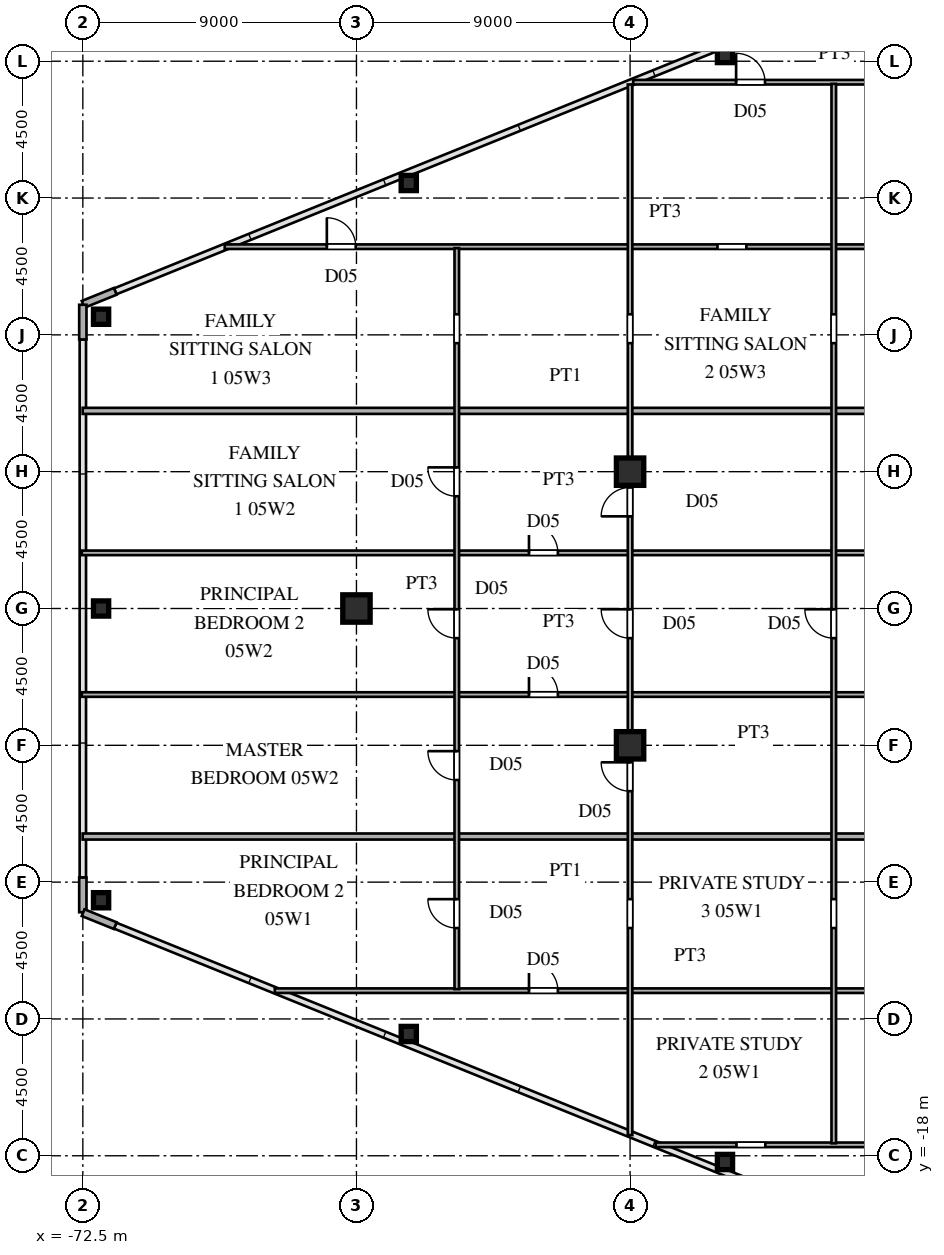
"""IFC4 building model, lengths in metres.
Left out: names, types, materials, properties, quantities, classifications, styles, units other than length and angle.
Written with IfcOpenShell. Run it as: python <this file> out.ifc"""

import sys

from ifc_helpers import new_model, si_unit, direction, frame, frame_2d, origin, origin_2d, place, context, subcontext, project, spatial, rectangle, hollow_rectangle, i_section, extrude, source, transform, mapped, element, fill, save


model = new_model("IFC4")
c1 = context("Model", 3, precision=1e-05, world=origin(), true_north=direction((0.0, 1.0)))
c2 = subcontext(c1, "Body", "Model", "MODEL_VIEW")
j1 = project(units=[si_unit("LENGTHUNIT", "METRE"), si_unit("PLANEANGLEUNIT", "RADIAN")], contexts=[c1])
p1 = place(None, origin())
s1 = spatial("IfcSite", under=j1, at=p1, CompositionType="ELEMENT")
p2 = place(p1, origin())
s2 = spatial("IfcBuilding", under=s1, at=p2, CompositionType="ELEMENT")
p3 = place(p2, frame((0.0, 0.0, 22.5)))
s3 = spatial("IfcBuildingStorey", under=s2, at=p3, CompositionType="ELEMENT", Elevation=22.5)
m1 = source(origin(), c2, "Body", "SweptSolid", [
    extrude(i_section(OverallWidth=0.9, OverallDepth=0.9, WebThickness=0.036, FlangeThickness=0.055, at=origin_2d()), origin(), (0.0, 0.0, 1.0), 3.6),
])
for number, where, z_axis, x_axis in (
    (1, (-54.5, -4.5, 0.0), (0.0, 0.0, 1.0), (1.0, 0.0, 0.0)),
    (2, (-54.5, 4.5, 0.0), (0.0, 0.0, 1.0), (1.0, 0.0, 0.0)),
    (3, (-63.5, 0.0, 0.0), (0.0, 0.0, 1.0), (1.0, 0.0, 0.0)),
):
    element("IfcColumn", number, at=place(p3, frame(where, z_axis=z_axis, x_axis=x_axis)), inside=s3, PredefinedType="COLUMN", context=c2, shape_type="MappedRepresentation", body=[
        mapped(m1, transform((0.0, 0.0, 0.0), scale=1.0)),
    ])
m2 = source(origin(), c2, "Body", "SweptSolid", [
    extrude(hollow_rectangle(XDim=0.5, YDim=0.5, WallThickness=0.02, at=origin_2d()), origin(), (0.0, 0.0, 1.0), 3.6),
])
for number, where, z_axis, x_axis in (
    (4, (-71.9, 9.596, 0.0), (0.0, 0.0, 1.0), (1.0, 0.0, 0.0)),
    (5, (-71.9, -9.596, 0.0), (0.0, 0.0, 1.0), (1.0, 0.0, 0.0)),
    (6, (-51.378, -18.204, 0.0), (0.0, 0.0, 1.0), (1.0, 0.0, 0.0)),
    (7, (-61.779, -13.994, 0.0), (0.0, 0.0, 1.0), (1.0, 0.0, 0.0)),
    (8, (-51.378, 18.204, 0.0), (0.0, 0.0, 1.0), (1.0, 0.0, 0.0)),
    (9, (-61.779, 13.994, 0.0), (0.0, 0.0, 1.0), (1.0, 0.0, 0.0)),
    (10, (-71.9, 0.0, 0.0), (0.0, 0.0, 1.0), (1.0, 0.0, 0.0)),
):
    element("IfcColumn", number, at=place(p3, frame(where, z_axis=z_axis, x_axis=x_axis)), inside=s3, PredefinedType="COLUMN", context=c2, shape_type="MappedRepresentation", body=[
        mapped(m2, transform((0.0, 0.0, 0.0), scale=1.0)),
    ])
for number, where, z_axis, x_axis in (
    (11, (-71.434, 10.431, 0.0), (0.0, 0.0, 1.0), (-0.927, -0.375, 0.0)),
    (12, (-72.5, 9.99, 0.0), (0.0, 0.0, 1.0), (0.0, -1.0, 0.0)),
    (13, (-72.5, -8.85, 0.0), (0.0, 0.0, 1.0), (0.0, -1.0, 0.0)),
    (14, (-72.491, -10.004, 0.0), (0.0, 0.0, 1.0), (0.927, -0.375, 0.0)),
):
    element("IfcWall", number, at=place(p3, frame(where, z_axis=z_axis, x_axis=x_axis)), inside=s3, PredefinedType="SOLIDWALL", context=c2, shape_type="SweptSolid", body=[
        extrude(rectangle(XDim=1.14, YDim=0.24, at=frame_2d((0.57, 0.0))), origin(), (0.0, 0.0, 1.0), 3.38),
    ])
p4 = place(p3, frame((-53.66, -17.64, 0.0), z_axis=(0.0, 0.0, 1.0), x_axis=(1.0, 0.0, 0.0)))
e15 = element("IfcWall", 15, at=p4, inside=s3, PredefinedType="PARTITIONING", context=c2, shape_type="SweptSolid", body=[
    extrude(rectangle(XDim=12.51, YDim=0.15, at=frame_2d((6.255, 0.0))), origin(), (0.0, 0.0, 1.0), 3.38),
])
p5 = place(p4, frame((8.735, 0.0, 0.0)))
e16 = element("IfcOpeningElement", 16, at=p5, cuts=e15, PredefinedType="OPENING", context=c2, shape_type="SweptSolid", body=[
    extrude(rectangle(XDim=0.95, YDim=2.15, at=frame_2d((0.475, 1.075))), frame((0.0, 0.085, 0.0), z_axis=(0.0, -1.0, 0.0), x_axis=(1.0, 0.0, 0.0)), (0.0, 0.0, 1.0), 0.17),
])
p6 = place(p4, frame((2.659, 0.0, 0.0)))
e17 = element("IfcOpeningElement", 17, at=p6, cuts=e15, PredefinedType="OPENING", context=c2, shape_type="SweptSolid", body=[
    extrude(rectangle(XDim=0.95, YDim=2.15, at=frame_2d((0.475, 1.075))), frame((0.0, 0.085, 0.0), z_axis=(0.0, -1.0, 0.0), x_axis=(1.0, 0.0, 0.0)), (0.0, 0.0, 1.0), 0.17),
])
p7 = place(p3, frame((-66.186, -12.57, 0.0), z_axis=(0.0, 0.0, 1.0), x_axis=(1.0, 0.0, 0.0)))
e18 = element("IfcWall", 18, at=p7, inside=s3, PredefinedType="PARTITIONING", context=c2, shape_type="SweptSolid", body=[
    extrude(rectangle(XDim=25.036, YDim=0.15, at=frame_2d((12.518, 0.0))), origin(), (0.0, 0.0, 1.0), 3.38),
])
p8 = place(p7, frame((21.261, 0.0, 0.0)))
e19 = element("IfcOpeningElement", 19, at=p8, cuts=e18, PredefinedType="OPENING", context=c2, shape_type="SweptSolid", body=[
    extrude(rectangle(XDim=0.95, YDim=2.15, at=frame_2d((0.475, 1.075))), frame((0.0, 0.085, 0.0), z_axis=(0.0, -1.0, 0.0), x_axis=(1.0, 0.0, 0.0)), (0.0, 0.0, 1.0), 0.17),
])
p9 = place(p7, frame((8.361, 0.0, 0.0)))
e20 = element("IfcOpeningElement", 20, at=p9, cuts=e18, PredefinedType="OPENING", context=c2, shape_type="SweptSolid", body=[
    extrude(rectangle(XDim=0.95, YDim=2.15, at=frame_2d((0.475, 1.075))), frame((0.0, 0.085, 0.0), z_axis=(0.0, -1.0, 0.0), x_axis=(1.0, 0.0, 0.0)), (0.0, 0.0, 1.0), 0.17),
])
p10 = place(p3, frame((-72.505, -7.5, 0.0), z_axis=(0.0, 0.0, 1.0), x_axis=(1.0, 0.0, 0.0)))
e21 = element("IfcWall", 21, at=p10, inside=s3, PredefinedType="PARTITIONING", context=c2, shape_type="SweptSolid", body=[
    extrude(rectangle(XDim=34.075, YDim=0.2, at=frame_2d((17.038, 0.0))), origin(), (0.0, 0.0, 1.0), 3.38),
])
p11 = place(p3, frame((-72.535, -2.83, 0.0), z_axis=(0.0, 0.0, 1.0), x_axis=(1.0, 0.0, 0.0)))
e22 = element("IfcWall", 22, at=p11, inside=s3, PredefinedType="PARTITIONING", context=c2, shape_type="SweptSolid", body=[
    extrude(rectangle(XDim=31.385, YDim=0.15, at=frame_2d((15.692, 0.0))), origin(), (0.0, 0.0, 1.0), 3.38),
])
p12 = place(p11, frame((27.61, 0.0, 0.0)))
e23 = element("IfcOpeningElement", 23, at=p12, cuts=e22, PredefinedType="OPENING", context=c2, shape_type="SweptSolid", body=[
    extrude(rectangle(XDim=0.95, YDim=2.15, at=frame_2d((0.475, 1.075))), frame((0.0, 0.085, 0.0), z_axis=(0.0, -1.0, 0.0), x_axis=(1.0, 0.0, 0.0)), (0.0, 0.0, 1.0), 0.17),
])
p13 = place(p11, frame((14.71, 0.0, 0.0)))
e24 = element("IfcOpeningElement", 24, at=p13, cuts=e22, PredefinedType="OPENING", context=c2, shape_type="SweptSolid", body=[
    extrude(rectangle(XDim=0.95, YDim=2.15, at=frame_2d((0.475, 1.075))), frame((0.0, 0.085, 0.0), z_axis=(0.0, -1.0, 0.0), x_axis=(1.0, 0.0, 0.0)), (0.0, 0.0, 1.0), 0.17),
])
p14 = place(p3, frame((-72.535, 1.83, 0.0), z_axis=(0.0, 0.0, 1.0), x_axis=(1.0, 0.0, 0.0)))
e25 = element("IfcWall", 25, at=p14, inside=s3, PredefinedType="PARTITIONING", context=c2, shape_type="SweptSolid", body=[
    extrude(rectangle(XDim=31.385, YDim=0.15, at=frame_2d((15.692, 0.0))), origin(), (0.0, 0.0, 1.0), 3.38),
])
p15 = place(p14, frame((27.61, 0.0, 0.0)))
e26 = element("IfcOpeningElement", 26, at=p15, cuts=e25, PredefinedType="OPENING", context=c2, shape_type="SweptSolid", body=[
    extrude(rectangle(XDim=0.95, YDim=2.15, at=frame_2d((0.475, 1.075))), frame((0.0, 0.085, 0.0), z_axis=(0.0, -1.0, 0.0), x_axis=(1.0, 0.0, 0.0)), (0.0, 0.0, 1.0), 0.17),
])
p16 = place(p14, frame((14.71, 0.0, 0.0)))
e27 = element("IfcOpeningElement", 27, at=p16, cuts=e25, PredefinedType="OPENING", context=c2, shape_type="SweptSolid", body=[
    extrude(rectangle(XDim=0.95, YDim=2.15, at=frame_2d((0.475, 1.075))), frame((0.0, 0.085, 0.0), z_axis=(0.0, -1.0, 0.0), x_axis=(1.0, 0.0, 0.0)), (0.0, 0.0, 1.0), 0.17),
])
p17 = place(p3, frame((-72.505, 6.5, 0.0), z_axis=(0.0, 0.0, 1.0), x_axis=(1.0, 0.0, 0.0)))
e28 = element("IfcWall", 28, at=p17, inside=s3, PredefinedType="PARTITIONING", context=c2, shape_type="SweptSolid", body=[
    extrude(rectangle(XDim=34.075, YDim=0.2, at=frame_2d((17.038, 0.0))), origin(), (0.0, 0.0, 1.0), 3.38),
])
p18 = place(p3, frame((-67.833, 11.9, 0.0), z_axis=(0.0, 0.0, 1.0), x_axis=(1.0, 0.0, 0.0)))
e29 = element("IfcWall", 29, at=p18, inside=s3, PredefinedType="PARTITIONING", context=c2, shape_type="SweptSolid", body=[
    extrude(rectangle(XDim=26.683, YDim=0.15, at=frame_2d((13.342, 0.0))), origin(), (0.0, 0.0, 1.0), 3.38),
])
p19 = place(p18, frame((22.908, 0.0, 0.0)))
e30 = element("IfcOpeningElement", 30, at=p19, cuts=e29, PredefinedType="OPENING", context=c2, shape_type="SweptSolid", body=[
    extrude(rectangle(XDim=0.95, YDim=2.15, at=frame_2d((0.475, 1.075))), frame((0.0, 0.085, 0.0), z_axis=(0.0, -1.0, 0.0), x_axis=(1.0, 0.0, 0.0)), (0.0, 0.0, 1.0), 0.17),
])
p20 = place(p18, frame((3.359, 0.0, 0.0)))
e31 = element("IfcOpeningElement", 31, at=p20, cuts=e29, PredefinedType="OPENING", context=c2, shape_type="SweptSolid", body=[
    extrude(rectangle(XDim=0.95, YDim=2.15, at=frame_2d((0.475, 1.075))), frame((0.0, 0.085, 0.0), z_axis=(0.0, -1.0, 0.0), x_axis=(1.0, 0.0, 0.0)), (0.0, 0.0, 1.0), 0.17),
])
p21 = place(p18, frame((16.208, 0.0, 0.0)))
e32 = element("IfcOpeningElement", 32, at=p21, cuts=e29, PredefinedType="OPENING", context=c2, shape_type="SweptSolid", body=[
    extrude(rectangle(XDim=0.95, YDim=2.15, at=frame_2d((0.475, 1.075))), frame((0.0, 0.085, 0.0), z_axis=(0.0, -1.0, 0.0), x_axis=(1.0, 0.0, 0.0)), (0.0, 0.0, 1.0), 0.17),
])
p22 = place(p3, frame((-54.399, 17.31, 0.0), z_axis=(0.0, 0.0, 1.0), x_axis=(1.0, 0.0, 0.0)))
e33 = element("IfcWall", 33, at=p22, inside=s3, PredefinedType="PARTITIONING", context=c2, shape_type="SweptSolid", body=[
    extrude(rectangle(XDim=13.249, YDim=0.15, at=frame_2d((6.625, 0.0))), origin(), (0.0, 0.0, 1.0), 3.38),
])
p23 = place(p22, frame((3.387, 0.0, 0.0)))
e34 = element("IfcOpeningElement", 34, at=p23, cuts=e33, PredefinedType="OPENING", context=c2, shape_type="SweptSolid", body=[
    extrude(rectangle(XDim=0.95, YDim=2.15, at=frame_2d((0.475, 1.075))), frame((0.0, 0.085, 0.0), z_axis=(0.0, -1.0, 0.0), x_axis=(1.0, 0.0, 0.0)), (0.0, 0.0, 1.0), 0.17),
])
p24 = place(p3, frame((-60.2, -12.52, 0.0), z_axis=(0.0, 0.0, 1.0), x_axis=(0.0, 1.0, 0.0)))
e35 = element("IfcWall", 35, at=p24, inside=s3, PredefinedType="PARTITIONING", context=c2, shape_type="SweptSolid", body=[
    extrude(rectangle(XDim=24.373, YDim=0.15, at=frame_2d((12.187, 0.0))), origin(), (0.0, 0.0, 1.0), 3.38),
])
p25 = place(p24, frame((2.01, 0.0, 0.0)))
e36 = element("IfcOpeningElement", 36, at=p25, cuts=e35, PredefinedType="OPENING", context=c2, shape_type="SweptSolid", body=[
    extrude(rectangle(XDim=0.95, YDim=2.15, at=frame_2d((0.475, 1.075))), frame((0.0, 0.085, 0.0), z_axis=(0.0, -1.0, 0.0), x_axis=(1.0, 0.0, 0.0)), (0.0, 0.0, 1.0), 0.17),
])
p26 = place(p24, frame((6.878, 0.0, 0.0)))
e37 = element("IfcOpeningElement", 37, at=p26, cuts=e35, PredefinedType="OPENING", context=c2, shape_type="SweptSolid", body=[
    extrude(rectangle(XDim=0.95, YDim=2.15, at=frame_2d((0.475, 1.075))), frame((0.0, 0.085, 0.0), z_axis=(0.0, -1.0, 0.0), x_axis=(1.0, 0.0, 0.0)), (0.0, 0.0, 1.0), 0.17),
])
p27 = place(p24, frame((11.545, 0.0, 0.0)))
e38 = element("IfcOpeningElement", 38, at=p27, cuts=e35, PredefinedType="OPENING", context=c2, shape_type="SweptSolid", body=[
    extrude(rectangle(XDim=0.95, YDim=2.15, at=frame_2d((0.475, 1.075))), frame((0.0, 0.085, 0.0), z_axis=(0.0, -1.0, 0.0), x_axis=(1.0, 0.0, 0.0)), (0.0, 0.0, 1.0), 0.17),
])
p28 = place(p24, frame((16.212, 0.0, 0.0)))
e39 = element("IfcOpeningElement", 39, at=p28, cuts=e35, PredefinedType="OPENING", context=c2, shape_type="SweptSolid", body=[
    extrude(rectangle(XDim=0.95, YDim=2.15, at=frame_2d((0.475, 1.075))), frame((0.0, 0.085, 0.0), z_axis=(0.0, -1.0, 0.0), x_axis=(1.0, 0.0, 0.0)), (0.0, 0.0, 1.0), 0.17),
])
p29 = place(p24, frame((21.247, 0.0, 0.0)))
e40 = element("IfcOpeningElement", 40, at=p29, cuts=e35, PredefinedType="OPENING", context=c2, shape_type="SweptSolid", body=[
    extrude(rectangle(XDim=0.95, YDim=2.15, at=frame_2d((0.475, 1.075))), frame((0.0, 0.085, 0.0), z_axis=(0.0, -1.0, 0.0), x_axis=(1.0, 0.0, 0.0)), (0.0, 0.0, 1.0), 0.17),
])
p30 = place(p3, frame((-54.5, -17.321, 0.0), z_axis=(0.0, 0.0, 1.0), x_axis=(0.0, 1.0, 0.0)))
e41 = element("IfcWall", 41, at=p30, inside=s3, PredefinedType="PARTITIONING", context=c2, shape_type="SweptSolid", body=[
    extrude(rectangle(XDim=34.557, YDim=0.15, at=frame_2d((17.279, 0.0))), origin(), (0.0, 0.0, 1.0), 2.68),
])
p31 = place(p30, frame((6.811, 0.0, 0.0)))
e42 = element("IfcOpeningElement", 42, at=p31, cuts=e41, PredefinedType="OPENING", context=c2, shape_type="SweptSolid", body=[
    extrude(rectangle(XDim=0.95, YDim=2.15, at=frame_2d((0.475, 1.075))), frame((0.0, 0.085, 0.0), z_axis=(0.0, -1.0, 0.0), x_axis=(1.0, 0.0, 0.0)), (0.0, 0.0, 1.0), 0.17),
])
p32 = place(p30, frame((16.346, 0.0, 0.0)))
e43 = element("IfcOpeningElement", 43, at=p32, cuts=e41, PredefinedType="OPENING", context=c2, shape_type="SweptSolid", body=[
    extrude(rectangle(XDim=0.95, YDim=2.15, at=frame_2d((0.475, 1.075))), frame((0.0, 0.085, 0.0), z_axis=(0.0, -1.0, 0.0), x_axis=(1.0, 0.0, 0.0)), (0.0, 0.0, 1.0), 0.17),
])
p33 = place(p30, frame((11.312, 0.0, 0.0)))
e44 = element("IfcOpeningElement", 44, at=p33, cuts=e41, PredefinedType="OPENING", context=c2, shape_type="SweptSolid", body=[
    extrude(rectangle(XDim=0.95, YDim=2.15, at=frame_2d((0.475, 1.075))), frame((0.0, 0.085, 0.0), z_axis=(0.0, -1.0, 0.0), x_axis=(1.0, 0.0, 0.0)), (0.0, 0.0, 1.0), 0.17),
])
p34 = place(p30, frame((20.352, 0.0, 0.0)))
e45 = element("IfcOpeningElement", 45, at=p34, cuts=e41, PredefinedType="OPENING", context=c2, shape_type="SweptSolid", body=[
    extrude(rectangle(XDim=0.95, YDim=2.15, at=frame_2d((0.475, 1.075))), frame((0.0, 0.085, 0.0), z_axis=(0.0, -1.0, 0.0), x_axis=(1.0, 0.0, 0.0)), (0.0, 0.0, 1.0), 0.17),
])
p35 = place(p30, frame((26.048, 0.0, 0.0)))
e46 = element("IfcOpeningElement", 46, at=p35, cuts=e41, PredefinedType="OPENING", context=c2, shape_type="SweptSolid", body=[
    extrude(rectangle(XDim=0.95, YDim=2.15, at=frame_2d((0.475, 1.075))), frame((0.0, 0.085, 0.0), z_axis=(0.0, -1.0, 0.0), x_axis=(1.0, 0.0, 0.0)), (0.0, 0.0, 1.0), 0.17),
])
p36 = place(p3, frame((-47.8, -17.59, 0.0), z_axis=(0.0, 0.0, 1.0), x_axis=(0.0, 1.0, 0.0)))
e47 = element("IfcWall", 47, at=p36, inside=s3, PredefinedType="PARTITIONING", context=c2, shape_type="SweptSolid", body=[
    extrude(rectangle(XDim=34.846, YDim=0.15, at=frame_2d((17.423, 0.0))), origin(), (0.0, 0.0, 1.0), 3.38),
])
p37 = place(p36, frame((7.08, 0.0, 0.0)))
e48 = element("IfcOpeningElement", 48, at=p37, cuts=e47, PredefinedType="OPENING", context=c2, shape_type="SweptSolid", body=[
    extrude(rectangle(XDim=0.95, YDim=2.15, at=frame_2d((0.475, 1.075))), frame((0.0, 0.085, 0.0), z_axis=(0.0, -1.0, 0.0), x_axis=(1.0, 0.0, 0.0)), (0.0, 0.0, 1.0), 0.17),
])
p38 = place(p36, frame((16.615, 0.0, 0.0)))
e49 = element("IfcOpeningElement", 49, at=p38, cuts=e47, PredefinedType="OPENING", context=c2, shape_type="SweptSolid", body=[
    extrude(rectangle(XDim=0.95, YDim=2.15, at=frame_2d((0.475, 1.075))), frame((0.0, 0.085, 0.0), z_axis=(0.0, -1.0, 0.0), x_axis=(1.0, 0.0, 0.0)), (0.0, 0.0, 1.0), 0.17),
])
p39 = place(p36, frame((26.317, 0.0, 0.0)))
e50 = element("IfcOpeningElement", 50, at=p39, cuts=e47, PredefinedType="OPENING", context=c2, shape_type="SweptSolid", body=[
    extrude(rectangle(XDim=0.95, YDim=2.15, at=frame_2d((0.475, 1.075))), frame((0.0, 0.085, 0.0), z_axis=(0.0, -1.0, 0.0), x_axis=(1.0, 0.0, 0.0)), (0.0, 0.0, 1.0), 0.17),
])
m3 = source(origin(), c2, "Body", "SweptSolid", [
    extrude(rectangle(XDim=0.95, YDim=2.15, at=frame_2d((0.475, 1.075))), frame((0.0, 0.025, 0.0), z_axis=(0.0, -1.0, 0.0), x_axis=(1.0, 0.0, 0.0)), (0.0, 0.0, 1.0), 0.05),
])
p40 = place(p9, origin())
e51 = element("IfcDoor", 51, at=p40, inside=s3, OperationType="SINGLE_SWING_LEFT", PredefinedType="DOOR", context=c2, shape_type="MappedRepresentation", body=[
    mapped(m3, transform((0.0, 0.0, 0.0), scale=1.0)),
])
fill(e20, e51)
p41 = place(p13, origin())
e52 = element("IfcDoor", 52, at=p41, inside=s3, OperationType="SINGLE_SWING_LEFT", PredefinedType="DOOR", context=c2, shape_type="MappedRepresentation", body=[
    mapped(m3, transform((0.0, 0.0, 0.0), scale=1.0)),
])
fill(e24, e52)
p42 = place(p16, origin())
e53 = element("IfcDoor", 53, at=p42, inside=s3, OperationType="SINGLE_SWING_LEFT", PredefinedType="DOOR", context=c2, shape_type="MappedRepresentation", body=[
    mapped(m3, transform((0.0, 0.0, 0.0), scale=1.0)),
])
fill(e27, e53)
p43 = place(p20, origin())
e54 = element("IfcDoor", 54, at=p43, inside=s3, OperationType="SINGLE_SWING_LEFT", PredefinedType="DOOR", context=c2, shape_type="MappedRepresentation", body=[
    mapped(m3, transform((0.0, 0.0, 0.0), scale=1.0)),
])
fill(e31, e54)
p44 = place(p23, origin())
e55 = element("IfcDoor", 55, at=p44, inside=s3, OperationType="SINGLE_SWING_LEFT", PredefinedType="DOOR", context=c2, shape_type="MappedRepresentation", body=[
    mapped(m3, transform((0.0, 0.0, 0.0), scale=1.0)),
])
fill(e34, e55)
p45 = place(p25, origin())
e56 = element("IfcDoor", 56, at=p45, inside=s3, OperationType="SINGLE_SWING_RIGHT", PredefinedType="DOOR", context=c2, shape_type="MappedRepresentation", body=[
    mapped(m3, transform((0.0, 0.0, 0.0), scale=1.0)),
])
fill(e36, e56)
p46 = place(p26, origin())
e57 = element("IfcDoor", 57, at=p46, inside=s3, OperationType="SINGLE_SWING_RIGHT", PredefinedType="DOOR", context=c2, shape_type="MappedRepresentation", body=[
    mapped(m3, transform((0.0, 0.0, 0.0), scale=1.0)),
])
fill(e37, e57)
p47 = place(p27, origin())
e58 = element("IfcDoor", 58, at=p47, inside=s3, OperationType="SINGLE_SWING_RIGHT", PredefinedType="DOOR", context=c2, shape_type="MappedRepresentation", body=[
    mapped(m3, transform((0.0, 0.0, 0.0), scale=1.0)),
])
fill(e38, e58)
p48 = place(p28, origin())
e59 = element("IfcDoor", 59, at=p48, inside=s3, OperationType="SINGLE_SWING_RIGHT", PredefinedType="DOOR", context=c2, shape_type="MappedRepresentation", body=[
    mapped(m3, transform((0.0, 0.0, 0.0), scale=1.0)),
])
fill(e39, e59)
p49 = place(p32, origin())
e60 = element("IfcDoor", 60, at=p49, inside=s3, OperationType="SINGLE_SWING_RIGHT", PredefinedType="DOOR", context=c2, shape_type="MappedRepresentation", body=[
    mapped(m3, transform((0.0, 0.0, 0.0), scale=1.0)),
])
fill(e43, e60)
p50 = place(p33, origin())
e61 = element("IfcDoor", 61, at=p50, inside=s3, OperationType="SINGLE_SWING_RIGHT", PredefinedType="DOOR", context=c2, shape_type="MappedRepresentation", body=[
    mapped(m3, transform((0.0, 0.0, 0.0), scale=1.0)),
])
fill(e44, e61)
p51 = place(p34, origin())
e62 = element("IfcDoor", 62, at=p51, inside=s3, OperationType="SINGLE_SWING_LEFT", PredefinedType="DOOR", context=c2, shape_type="MappedRepresentation", body=[
    mapped(m3, transform((0.0, 0.0, 0.0), scale=1.0)),
])
fill(e45, e62)
p52 = place(p38, origin())
e63 = element("IfcDoor", 63, at=p52, inside=s3, OperationType="SINGLE_SWING_RIGHT", PredefinedType="DOOR", context=c2, shape_type="MappedRepresentation", body=[
    mapped(m3, transform((0.0, 0.0, 0.0), scale=1.0)),
])
fill(e49, e63)
save(model, sys.argv[1])
